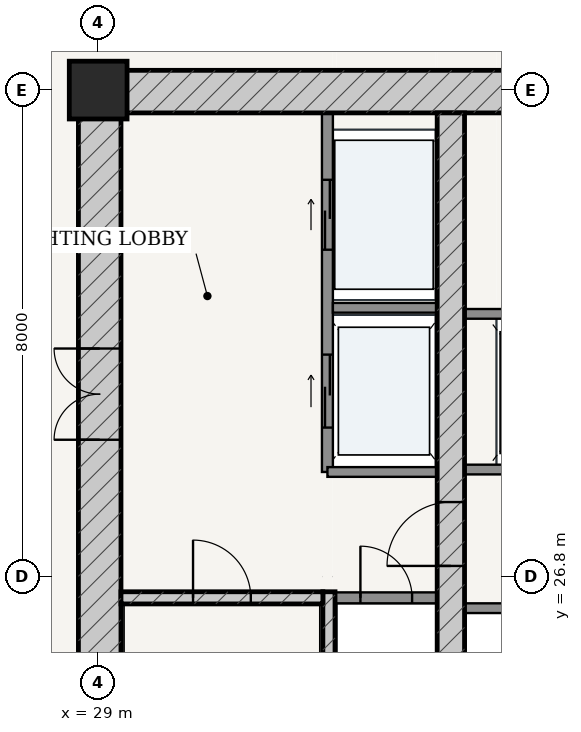
"""IFC4 building model, lengths in metres.
Left out: names, types, materials, properties, quantities, classifications, styles, units other than length and angle.
Written with IfcOpenShell. Run it as: python <this file> out.ifc"""

import sys

from ifc_helpers import new_model, si_unit, direction, frame, frame_2d, origin, origin_2d, place, context, subcontext, project, spatial, rectangle, extrude, source, transform, mapped, element, fill, save


model = new_model("IFC4")
c1 = context("Model", 3, precision=1e-05, world=origin(), true_north=direction((-0.2419218956, 0.970295726276)))
c2 = subcontext(c1, "Body", "Model", "MODEL_VIEW")
j1 = project(units=[si_unit("LENGTHUNIT", "METRE"), si_unit("PLANEANGLEUNIT", "RADIAN")], contexts=[c1])
p1 = place(None, origin())
s1 = spatial("IfcSite", under=j1, at=p1, CompositionType="ELEMENT")
p2 = place(p1, origin())
s2 = spatial("IfcBuilding", under=s1, at=p2, CompositionType="ELEMENT")
p3 = place(p2, frame((0.0, 0.0, 105.0)))
s3 = spatial("IfcBuildingStorey", under=s2, at=p3, CompositionType="ELEMENT", Elevation=105.0)
p4 = place(p3, frame((29.0, 34.8, 0.0), z_axis=(0.0, 0.0, 1.0), x_axis=(1.0, 0.0, 0.0)))
e1 = element("IfcColumn", 1, at=p4, inside=s3, PredefinedType="COLUMN", context=c2, shape_type="SweptSolid", body=[
    extrude(rectangle(XDim=0.95, YDim=0.95, at=origin_2d()), origin(), (0.0, 0.0, 1.0), 3.6),
])
p5 = place(p3, frame((28.675, 34.775, 0.0), z_axis=(0.0, 0.0, 1.0), x_axis=(1.0, 0.0, 0.0)))
e2 = element("IfcWall", 2, at=p5, inside=s3, PredefinedType="SHEAR", context=c2, shape_type="SweptSolid", body=[
    extrude(rectangle(XDim=18.65, YDim=0.7, at=frame_2d((9.325, 0.0))), origin(), (0.0, 0.0, 1.0), 3.325),
])
p6 = place(p5, frame((7.357, 0.0, 0.0)))
e3 = element("IfcOpeningElement", 3, at=p6, cuts=e2, PredefinedType="OPENING", context=c2, shape_type="SweptSolid", body=[
    extrude(rectangle(XDim=0.86, YDim=2.1, at=frame_2d((0.43, 1.05))), frame((0.0, 0.36, 0.0), z_axis=(0.0, -1.0, 0.0), x_axis=(1.0, 0.0, 0.0)), (0.0, 0.0, 1.0), 0.72),
])
p7 = place(p5, frame((10.438, 0.0, 0.0)))
e4 = element("IfcOpeningElement", 4, at=p7, cuts=e2, PredefinedType="OPENING", context=c2, shape_type="SweptSolid", body=[
    extrude(rectangle(XDim=0.85, YDim=2.1, at=frame_2d((0.425, 1.05))), frame((0.0, 0.36, 0.0), z_axis=(0.0, -1.0, 0.0), x_axis=(1.0, 0.0, 0.0)), (0.0, 0.0, 1.0), 0.72),
])
p8 = place(p3, frame((29.025, 19.175, 0.0), z_axis=(0.0, 0.0, 1.0), x_axis=(0.0, 1.0, 0.0)))
e5 = element("IfcWall", 5, at=p8, inside=s3, PredefinedType="SHEAR", context=c2, shape_type="SweptSolid", body=[
    extrude(rectangle(XDim=15.25, YDim=0.7, at=frame_2d((7.625, 0.0))), origin(), (0.0, 0.0, 1.0), 3.325),
])
p9 = place(p8, frame((9.875, 0.0, 0.0)))
e6 = element("IfcOpeningElement", 6, at=p9, cuts=e5, PredefinedType="OPENING", context=c2, shape_type="SweptSolid", body=[
    extrude(rectangle(XDim=1.5, YDim=2.2, at=frame_2d((0.75, 1.1))), frame((0.0, 0.36, 0.0), z_axis=(0.0, -1.0, 0.0), x_axis=(1.0, 0.0, 0.0)), (0.0, 0.0, 1.0), 0.72),
])
p10 = place(p3, frame((32.795, 19.175, 0.0), z_axis=(0.0, 0.0, 1.0), x_axis=(0.0, 1.0, 0.0)))
e7 = element("IfcWall", 7, at=p10, inside=s3, PredefinedType="SOLIDWALL", context=c2, shape_type="SweptSolid", body=[
    extrude(rectangle(XDim=7.375, YDim=0.2, at=frame_2d((3.688, 0.0))), origin(), (0.0, 0.0, 1.0), 3.325),
])
p11 = place(p3, frame((29.375, 26.45, 0.0), z_axis=(0.0, 0.0, 1.0), x_axis=(1.0, 0.0, 0.0)))
e8 = element("IfcWall", 8, at=p11, inside=s3, PredefinedType="SOLIDWALL", context=c2, shape_type="SweptSolid", body=[
    extrude(rectangle(XDim=3.32, YDim=0.2, at=frame_2d((1.66, 0.0))), origin(), (0.0, 0.0, 1.0), 3.325),
])
p12 = place(p11, frame((1.185, 0.0, 0.0)))
e9 = element("IfcOpeningElement", 9, at=p12, cuts=e8, PredefinedType="OPENING", context=c2, shape_type="SweptSolid", body=[
    extrude(rectangle(XDim=0.95, YDim=2.15, at=frame_2d((0.475, 1.075))), frame((0.0, 0.11, 0.0), z_axis=(0.0, -1.0, 0.0), x_axis=(1.0, 0.0, 0.0)), (0.0, 0.0, 1.0), 0.22),
])
p13 = place(p3, frame((34.8, 19.175, 0.0), z_axis=(0.0, 0.0, 1.0), x_axis=(0.0, 1.0, 0.0)))
e10 = element("IfcWall", 10, at=p13, inside=s3, PredefinedType="SHEAR", context=c2, shape_type="SweptSolid", body=[
    extrude(rectangle(XDim=15.25, YDim=0.45, at=frame_2d((7.625, 0.0))), origin(), (0.0, 0.0, 1.0), 3.325),
])
p14 = place(p13, frame((7.8, 0.0, 0.0)))
e11 = element("IfcOpeningElement", 11, at=p14, cuts=e10, PredefinedType="OPENING", context=c2, shape_type="SweptSolid", body=[
    extrude(rectangle(XDim=1.05, YDim=2.15, at=frame_2d((0.525, 1.075))), frame((0.0, 0.235, 0.0), z_axis=(0.0, -1.0, 0.0), x_axis=(1.0, 0.0, 0.0)), (0.0, 0.0, 1.0), 0.47),
])
p15 = place(p3, frame((32.9, 26.45, 0.0), z_axis=(0.0, 0.0, 1.0), x_axis=(1.0, 0.0, 0.0)))
e12 = element("IfcWall", 12, at=p15, inside=s3, PredefinedType="PARTITIONING", context=c2, shape_type="SweptSolid", body=[
    extrude(rectangle(XDim=1.675, YDim=0.18, at=frame_2d((0.837, 0.0))), origin(), (0.0, 0.0, 1.0), 3.325),
])
p16 = place(p15, frame((0.413, 0.0, 0.0)))
e13 = element("IfcOpeningElement", 13, at=p16, cuts=e12, PredefinedType="OPENING", context=c2, shape_type="SweptSolid", body=[
    extrude(rectangle(XDim=0.85, YDim=2.1, at=frame_2d((0.425, 1.05))), frame((0.0, 0.1, 0.0), z_axis=(0.0, -1.0, 0.0), x_axis=(1.0, 0.0, 0.0)), (0.0, 0.0, 1.0), 0.2),
])
p17 = place(p3, frame((32.77, 28.52, 0.0), z_axis=(0.0, 0.0, 1.0), x_axis=(0.0, 1.0, 0.0)))
e14 = element("IfcWall", 14, at=p17, inside=s3, PredefinedType="PARTITIONING", context=c2, shape_type="SweptSolid", body=[
    extrude(rectangle(XDim=5.905, YDim=0.18, at=frame_2d((2.953, 0.0))), origin(), (0.0, 0.0, 1.0), 3.325),
])
p18 = place(p17, frame((3.655, 0.0, 0.0)))
e15 = element("IfcOpeningElement", 15, at=p18, cuts=e14, PredefinedType="OPENING", context=c2, shape_type="SweptSolid", body=[
    extrude(rectangle(XDim=1.15, YDim=2.2, at=frame_2d((0.575, 1.1))), frame((0.0, 0.1, 0.0), z_axis=(0.0, -1.0, 0.0), x_axis=(1.0, 0.0, 0.0)), (0.0, 0.0, 1.0), 0.2),
])
p19 = place(p17, frame((0.73, 0.0, 0.0)))
e16 = element("IfcOpeningElement", 16, at=p19, cuts=e14, PredefinedType="OPENING", context=c2, shape_type="SweptSolid", body=[
    extrude(rectangle(XDim=1.2, YDim=2.25, at=frame_2d((0.6, 1.125))), frame((0.0, 0.1, 0.0), z_axis=(0.0, -1.0, 0.0), x_axis=(1.0, 0.0, 0.0)), (0.0, 0.0, 1.0), 0.2),
])
p20 = place(p3, frame((32.86, 31.22, 0.0), z_axis=(0.0, 0.0, 1.0), x_axis=(1.0, 0.0, 0.0)))
e17 = element("IfcWall", 17, at=p20, inside=s3, PredefinedType="PARTITIONING", context=c2, shape_type="SweptSolid", body=[
    extrude(rectangle(XDim=1.715, YDim=0.16, at=frame_2d((0.857, 0.0))), origin(), (0.0, 0.0, 1.0), 3.325),
])
p21 = place(p3, frame((32.77, 28.52, 0.0), z_axis=(0.0, 0.0, 1.0), x_axis=(1.0, 0.0, 0.0)))
e18 = element("IfcWall", 18, at=p21, inside=s3, PredefinedType="PARTITIONING", context=c2, shape_type="SweptSolid", body=[
    extrude(rectangle(XDim=1.805, YDim=0.16, at=frame_2d((0.902, 0.0))), origin(), (0.0, 0.0, 1.0), 3.325),
])
p22 = place(p3, frame((35.025, 28.56, 0.0), z_axis=(0.0, 0.0, 1.0), x_axis=(1.0, 0.0, 0.0)))
e19 = element("IfcWall", 19, at=p22, inside=s3, PredefinedType="PARTITIONING", context=c2, shape_type="SweptSolid", body=[
    extrude(rectangle(XDim=5.95, YDim=0.16, at=frame_2d((2.975, 0.0))), origin(), (0.0, 0.0, 1.0), 3.325),
])
p23 = place(p22, frame((0.76, 0.0, 0.0)))
e20 = element("IfcOpeningElement", 20, at=p23, cuts=e19, PredefinedType="OPENING", context=c2, shape_type="SweptSolid", body=[
    extrude(rectangle(XDim=1.1, YDim=2.2, at=frame_2d((0.55, 1.1))), frame((0.0, 0.09, 0.0), z_axis=(0.0, -1.0, 0.0), x_axis=(1.0, 0.0, 0.0)), (0.0, 0.0, 1.0), 0.18),
])
p24 = place(p22, frame((2.425, 0.0, 0.0)))
e21 = element("IfcOpeningElement", 21, at=p24, cuts=e19, PredefinedType="OPENING", context=c2, shape_type="SweptSolid", body=[
    extrude(rectangle(XDim=1.1, YDim=2.2, at=frame_2d((0.55, 1.1))), frame((0.0, 0.09, 0.0), z_axis=(0.0, -1.0, 0.0), x_axis=(1.0, 0.0, 0.0)), (0.0, 0.0, 1.0), 0.18),
])
p25 = place(p22, frame((4.09, 0.0, 0.0)))
e22 = element("IfcOpeningElement", 22, at=p25, cuts=e19, PredefinedType="OPENING", context=c2, shape_type="SweptSolid", body=[
    extrude(rectangle(XDim=1.1, YDim=2.2, at=frame_2d((0.55, 1.1))), frame((0.0, 0.09, 0.0), z_axis=(0.0, -1.0, 0.0), x_axis=(1.0, 0.0, 0.0)), (0.0, 0.0, 1.0), 0.18),
])
for number, where, z_axis, x_axis in (
    (23, (35.025, 31.12, 0.0), (0.0, 0.0, 1.0), (1.0, 0.0, 0.0)),
    (24, (35.025, 26.28, 0.0), (0.0, 0.0, 1.0), (1.0, 0.0, 0.0)),
):
    element("IfcWall", number, at=place(p3, frame(where, z_axis=z_axis, x_axis=x_axis)), inside=s3, PredefinedType="PARTITIONING", context=c2, shape_type="SweptSolid", body=[
        extrude(rectangle(XDim=5.95, YDim=0.16, at=frame_2d((2.975, 0.0))), origin(), (0.0, 0.0, 1.0), 3.325),
    ])
m1 = source(origin(), c2, "Body", "SweptSolid", [
    extrude(rectangle(XDim=1.5, YDim=2.2, at=frame_2d((0.75, 1.1))), frame((0.0, 0.025, 0.0), z_axis=(0.0, -1.0, 0.0), x_axis=(1.0, 0.0, 0.0)), (0.0, 0.0, 1.0), 0.05),
])
p26 = place(p9, origin())
e25 = element("IfcDoor", 25, at=p26, inside=s3, OperationType="DOUBLE_DOOR_SINGLE_SWING", PredefinedType="DOOR", context=c2, shape_type="MappedRepresentation", body=[
    mapped(m1, transform((0.0, 0.0, 0.0), scale=1.0)),
])
fill(e6, e25)
m2 = source(origin(), c2, "Body", "SweptSolid", [
    extrude(rectangle(XDim=1.05, YDim=2.15, at=frame_2d((0.525, 1.075))), frame((0.0, 0.025, 0.0), z_axis=(0.0, -1.0, 0.0), x_axis=(1.0, 0.0, 0.0)), (0.0, 0.0, 1.0), 0.05),
])
p27 = place(p14, origin())
e26 = element("IfcDoor", 26, at=p27, inside=s3, OperationType="SINGLE_SWING_LEFT", PredefinedType="DOOR", context=c2, shape_type="MappedRepresentation", body=[
    mapped(m2, transform((0.0, 0.0, 0.0), scale=1.0)),
])
fill(e11, e26)
m3 = source(origin(), c2, "Body", "SweptSolid", [
    extrude(rectangle(XDim=0.95, YDim=2.15, at=frame_2d((0.475, 1.075))), frame((0.0, 0.025, 0.0), z_axis=(0.0, -1.0, 0.0), x_axis=(1.0, 0.0, 0.0)), (0.0, 0.0, 1.0), 0.05),
])
p28 = place(p12, origin())
e27 = element("IfcDoor", 27, at=p28, inside=s3, OperationType="SINGLE_SWING_LEFT", PredefinedType="DOOR", context=c2, shape_type="MappedRepresentation", body=[
    mapped(m3, transform((0.0, 0.0, 0.0), scale=1.0)),
])
fill(e9, e27)
m4 = source(origin(), c2, "Body", "SweptSolid", [
    extrude(rectangle(XDim=0.85, YDim=2.1, at=frame_2d((0.425, 1.05))), frame((0.0, 0.025, 0.0), z_axis=(0.0, -1.0, 0.0), x_axis=(1.0, 0.0, 0.0)), (0.0, 0.0, 1.0), 0.05),
])
p29 = place(p16, origin())
e28 = element("IfcDoor", 28, at=p29, inside=s3, OperationType="SINGLE_SWING_LEFT", PredefinedType="DOOR", context=c2, shape_type="MappedRepresentation", body=[
    mapped(m4, transform((0.0, 0.0, 0.0), scale=1.0)),
])
fill(e13, e28)
m5 = source(origin(), c2, "Body", "SweptSolid", [
    extrude(rectangle(XDim=1.15, YDim=2.2, at=frame_2d((0.575, 1.1))), frame((0.0, 0.025, 0.0), z_axis=(0.0, -1.0, 0.0), x_axis=(1.0, 0.0, 0.0)), (0.0, 0.0, 1.0), 0.05),
])
p30 = place(p18, origin())
e29 = element("IfcDoor", 29, at=p30, inside=s3, OperationType="DOUBLE_DOOR_SLIDING", PredefinedType="DOOR", context=c2, shape_type="MappedRepresentation", body=[
    mapped(m5, transform((0.0, 0.0, 0.0), scale=1.0)),
])
fill(e15, e29)
m6 = source(origin(), c2, "Body", "SweptSolid", [
    extrude(rectangle(XDim=1.2, YDim=2.25, at=frame_2d((0.6, 1.125))), frame((0.0, 0.025, 0.0), z_axis=(0.0, -1.0, 0.0), x_axis=(1.0, 0.0, 0.0)), (0.0, 0.0, 1.0), 0.05),
])
p31 = place(p19, origin())
e30 = element("IfcDoor", 30, at=p31, inside=s3, OperationType="DOUBLE_DOOR_SLIDING", PredefinedType="DOOR", context=c2, shape_type="MappedRepresentation", body=[
    mapped(m6, transform((0.0, 0.0, 0.0), scale=1.0)),
])
fill(e16, e30)
save(model, sys.argv[1])
